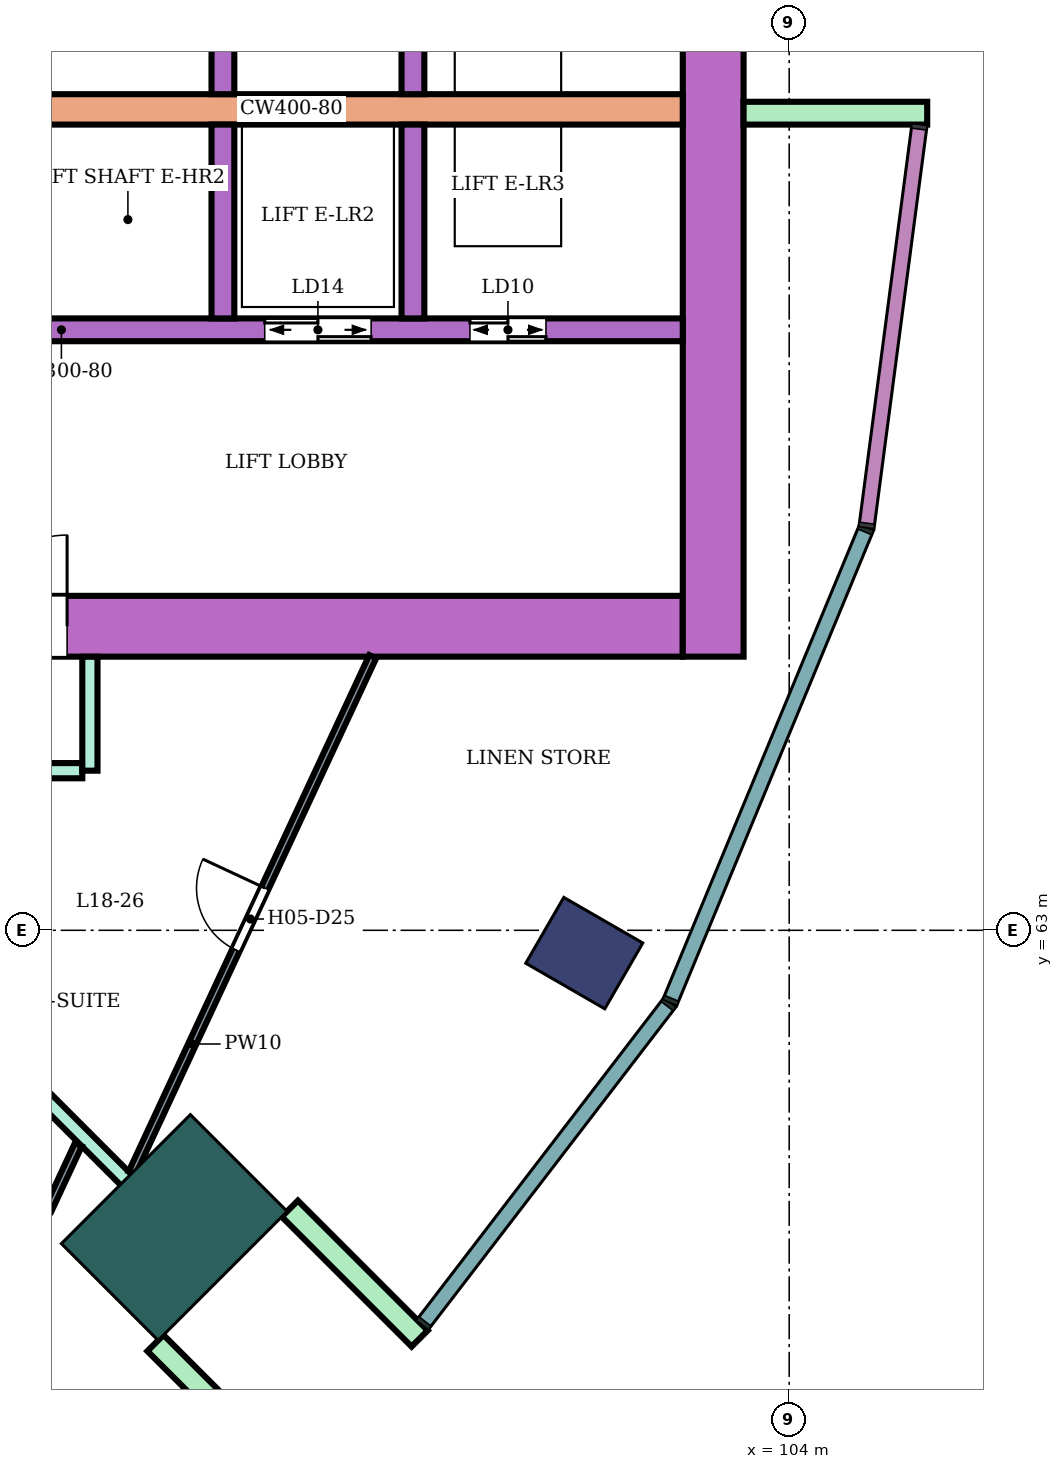
"""IFC4 building model, lengths in metres.
Left out: names, types, materials, properties, quantities, classifications, styles, units other than length and angle.
Written with IfcOpenShell. Run it as: python <this file> out.ifc"""

import sys

from ifc_helpers import new_model, si_unit, direction, frame, frame_2d, origin, origin_2d, place, context, subcontext, project, spatial, rectangle, extrude, element, fill, save


model = new_model("IFC4")
c1 = context("Model", 3, precision=1e-05, world=origin(), true_north=direction((0.0, 1.0)))
c2 = subcontext(c1, "Body", "Model", "MODEL_VIEW")
j1 = project(units=[si_unit("LENGTHUNIT", "METRE"), si_unit("PLANEANGLEUNIT", "RADIAN")], contexts=[c1])
p1 = place(None, origin())
s1 = spatial("IfcSite", under=j1, at=p1, CompositionType="ELEMENT")
p2 = place(p1, origin())
s2 = spatial("IfcBuilding", under=s1, at=p2, CompositionType="ELEMENT")
p3 = place(p2, frame((0.0, 0.0, 82.4)))
s3 = spatial("IfcBuildingStorey", under=s2, at=p3, CompositionType="ELEMENT", Elevation=82.4)
p4 = place(p3, frame((101.304, 62.7, 0.0), z_axis=(0.0, 0.0, 1.0), x_axis=(0.866025403784, -0.5, 0.0)))
e1 = element("IfcColumn", 1, at=p4, inside=s3, PredefinedType="COLUMN", context=c2, shape_type="SweptSolid", body=[
    extrude(rectangle(XDim=1.2, YDim=1.0, at=origin_2d()), origin(), (0.0, 0.0, 1.0), 3.8),
])
p5 = place(p3, frame((95.91, 59.09, 0.0), z_axis=(0.0, 0.0, 1.0), x_axis=(0.707106781187, -0.707106781187, 0.0)))
e2 = element("IfcColumn", 2, at=p5, inside=s3, PredefinedType="COLUMN", context=c2, shape_type="SweptSolid", body=[
    extrude(rectangle(XDim=1.8, YDim=2.4, at=origin_2d()), origin(), (0.0, 0.0, 1.0), 3.8),
])
p6 = place(p3, frame((87.9, 67.0, 0.0), z_axis=(0.0, 0.0, 1.0), x_axis=(1.0, 0.0, 0.0)))
e3 = element("IfcWall", 3, at=p6, inside=s3, PredefinedType="SHEAR", context=c2, shape_type="SweptSolid", body=[
    extrude(rectangle(XDim=14.7, YDim=0.8, at=frame_2d((7.35, 0.0))), origin(), (0.0, 0.0, 1.0), 3.48),
])
p7 = place(p6, frame((4.2, 0.0, 0.0)))
e4 = element("IfcOpeningElement", 4, at=p7, cuts=e3, PredefinedType="OPENING", context=c2, shape_type="SweptSolid", body=[
    extrude(rectangle(XDim=2.4, YDim=2.4, at=frame_2d((1.2, 1.2))), frame((0.0, 0.41, 0.0), z_axis=(0.0, -1.0, 0.0), x_axis=(1.0, 0.0, 0.0)), (0.0, 0.0, 1.0), 0.82),
])
p8 = place(p3, frame((103.0, 66.6, 0.0), z_axis=(0.0, 0.0, 1.0), x_axis=(0.0, 1.0, 0.0)))
e5 = element("IfcWall", 5, at=p8, inside=s3, PredefinedType="SHEAR", context=c2, shape_type="SweptSolid", body=[
    extrude(rectangle(XDim=16.8, YDim=0.8, at=frame_2d((8.4, 0.0))), origin(), (0.0, 0.0, 1.0), 3.48),
])
p9 = place(p3, frame((91.7, 73.8, 0.0), z_axis=(0.0, 0.0, 1.0), x_axis=(1.0, 0.0, 0.0)))
e6 = element("IfcWall", 6, at=p9, inside=s3, PredefinedType="SHEAR", context=c2, shape_type="SweptSolid", body=[
    extrude(rectangle(XDim=10.9, YDim=0.4, at=frame_2d((5.45, 0.0))), origin(), (0.0, 0.0, 1.0), 3.48),
])
p10 = place(p3, frame((91.7, 70.9, 0.0), z_axis=(0.0, 0.0, 1.0), x_axis=(1.0, 0.0, 0.0)))
e7 = element("IfcWall", 7, at=p10, inside=s3, PredefinedType="SHEAR", context=c2, shape_type="SweptSolid", body=[
    extrude(rectangle(XDim=10.9, YDim=0.3, at=frame_2d((5.45, 0.0))), origin(), (0.0, 0.0, 1.0), 3.48),
])
p11 = place(p10, frame((0.4, 0.0, 0.0)))
e8 = element("IfcOpeningElement", 8, at=p11, cuts=e7, PredefinedType="OPENING", context=c2, shape_type="SweptSolid", body=[
    extrude(rectangle(XDim=1.4, YDim=2.1, at=frame_2d((0.7, 1.05))), frame((0.0, 0.16, 0.0), z_axis=(0.0, -1.0, 0.0), x_axis=(1.0, 0.0, 0.0)), (0.0, 0.0, 1.0), 0.32),
])
p12 = place(p10, frame((5.4, 0.0, 0.0)))
e9 = element("IfcOpeningElement", 9, at=p12, cuts=e7, PredefinedType="OPENING", context=c2, shape_type="SweptSolid", body=[
    extrude(rectangle(XDim=1.4, YDim=2.1, at=frame_2d((0.7, 1.05))), frame((0.0, 0.16, 0.0), z_axis=(0.0, -1.0, 0.0), x_axis=(1.0, 0.0, 0.0)), (0.0, 0.0, 1.0), 0.32),
])
p13 = place(p10, frame((8.1, 0.0, 0.0)))
e10 = element("IfcOpeningElement", 10, at=p13, cuts=e7, PredefinedType="OPENING", context=c2, shape_type="SweptSolid", body=[
    extrude(rectangle(XDim=1.0, YDim=2.1, at=frame_2d((0.5, 1.05))), frame((0.0, 0.16, 0.0), z_axis=(0.0, -1.0, 0.0), x_axis=(1.0, 0.0, 0.0)), (0.0, 0.0, 1.0), 0.32),
])
for number, where, z_axis, x_axis in (
    (11, (96.55, 74.0, 0.0), (0.0, 0.0, 1.0), (0.0, 1.0, 0.0)),
    (12, (99.05, 74.0, 0.0), (0.0, 0.0, 1.0), (0.0, 1.0, 0.0)),
    (13, (96.55, 71.05, 0.0), (0.0, 0.0, 1.0), (0.0, 1.0, 0.0)),
    (14, (99.05, 71.05, 0.0), (0.0, 0.0, 1.0), (0.0, 1.0, 0.0)),
):
    element("IfcWall", number, at=place(p3, frame(where, z_axis=z_axis, x_axis=x_axis)), inside=s3, PredefinedType="SHEAR", context=c2, shape_type="SweptSolid", body=[
        extrude(rectangle(XDim=2.55, YDim=0.3, at=frame_2d((1.275, 0.0))), origin(), (0.0, 0.0, 1.0), 3.48),
    ])
for number, where, z_axis, x_axis in (
    (15, (103.4, 73.75, 0.0), (0.0, 0.0, 1.0), (1.0, 0.0, 0.0)),
    (16, (95.662, 57.57, 0.0), (0.0, 0.0, 1.0), (0.707, -0.707, 0.0)),
    (17, (97.43, 59.338, 0.0), (0.0, 0.0, 1.0), (0.707, -0.707, 0.0)),
):
    element("IfcWall", number, at=place(p3, frame(where, z_axis=z_axis, x_axis=x_axis)), inside=s3, PredefinedType="NOTDEFINED", context=c2, shape_type="SweptSolid", body=[
        extrude(rectangle(XDim=2.416, YDim=0.3, at=frame_2d((1.208, 0.0))), origin(), (0.0, 0.0, 1.0), 3.8),
    ])
p14 = place(p3, frame((92.692, 62.303, 0.0), z_axis=(0.0, 0.0, 1.0), x_axis=(0.706920663731, -0.707292849667, 0.0)))
e18 = element("IfcWall", 18, at=p14, inside=s3, PredefinedType="PARTITIONING", context=c2, shape_type="SweptSolid", body=[
    extrude(rectangle(XDim=5.248, YDim=0.2, at=frame_2d((2.624, 0.0))), origin(), (0.0, 0.0, 1.0), 3.35),
])
p15 = place(p3, frame((93.851, 65.1, 0.0), z_axis=(0.0, 0.0, 1.0), x_axis=(1.0, 0.0, 0.0)))
e19 = element("IfcWall", 19, at=p15, inside=s3, PredefinedType="PARTITIONING", context=c2, shape_type="SweptSolid", body=[
    extrude(rectangle(XDim=0.849, YDim=0.2, at=frame_2d((0.424, 0.0))), origin(), (0.0, 0.0, 1.0), 3.35),
])
p16 = place(p3, frame((94.8, 65.1, 0.0), z_axis=(0.0, 0.0, 1.0), x_axis=(0.0, 1.0, 0.0)))
e20 = element("IfcWall", 20, at=p16, inside=s3, PredefinedType="PARTITIONING", context=c2, shape_type="SweptSolid", body=[
    extrude(rectangle(XDim=1.499, YDim=0.2, at=frame_2d((0.75, 0.0))), origin(), (0.0, 0.0, 1.0), 3.35),
])
p17 = place(p3, frame((94.247, 59.32, 0.0), z_axis=(0.0, 0.0, 1.0), x_axis=(0.422660124657, 0.906288264861, 0.0)))
e21 = element("IfcWall", 21, at=p17, inside=s3, PredefinedType="PARTITIONING", context=c2, shape_type="SweptSolid", body=[
    extrude(rectangle(XDim=0.949, YDim=0.1, at=frame_2d((0.475, 0.0))), origin(), (0.0, 0.0, 1.0), 3.35),
])
p18 = place(p3, frame((95.355, 59.806, 0.0), z_axis=(0.0, 0.0, 1.0), x_axis=(0.422407546544, 0.906406015328, 0.0)))
e22 = element("IfcWall", 22, at=p18, inside=s3, PredefinedType="PARTITIONING", context=c2, shape_type="SweptSolid", body=[
    extrude(rectangle(XDim=7.496, YDim=0.1, at=frame_2d((3.748, 0.0))), origin(), (0.0, 0.0, 1.0), 3.35),
])
p19 = place(p18, frame((3.238, 0.0, 0.0)))
e23 = element("IfcOpeningElement", 23, at=p19, cuts=e22, PredefinedType="OPENING", context=c2, shape_type="SweptSolid", body=[
    extrude(rectangle(XDim=0.9, YDim=2.1, at=frame_2d((0.45, 1.05))), frame((0.0, 0.06, 0.0), z_axis=(0.0, -1.0, 0.0), x_axis=(1.0, 0.0, 0.0)), (0.0, 0.0, 1.0), 0.12),
])
p20 = place(p19, origin())
e24 = element("IfcDoor", 24, at=p20, inside=s3, OperationType="SINGLE_SWING_RIGHT", PredefinedType="DOOR", context=c2, shape_type="SweptSolid", body=[
    extrude(rectangle(XDim=0.9, YDim=2.1, at=frame_2d((0.45, 1.05))), frame((0.0, 0.025, 0.0), z_axis=(0.0, -1.0, 0.0), x_axis=(1.0, 0.0, 0.0)), (0.0, 0.0, 1.0), 0.05),
])
fill(e23, e24)
p21 = place(p12, origin())
e25 = element("IfcDoor", 25, at=p21, inside=s3, OperationType="DOUBLE_DOOR_SLIDING", PredefinedType="DOOR", context=c2, shape_type="SweptSolid", body=[
    extrude(rectangle(XDim=1.4, YDim=2.1, at=frame_2d((0.7, 1.05))), frame((0.0, 0.025, 0.0), z_axis=(0.0, -1.0, 0.0), x_axis=(1.0, 0.0, 0.0)), (0.0, 0.0, 1.0), 0.05),
])
fill(e9, e25)
p22 = place(p13, origin())
e26 = element("IfcDoor", 26, at=p22, inside=s3, OperationType="DOUBLE_DOOR_SLIDING", PredefinedType="DOOR", context=c2, shape_type="SweptSolid", body=[
    extrude(rectangle(XDim=1.0, YDim=2.1, at=frame_2d((0.5, 1.05))), frame((0.0, 0.025, 0.0), z_axis=(0.0, -1.0, 0.0), x_axis=(1.0, 0.0, 0.0)), (0.0, 0.0, 1.0), 0.05),
])
fill(e10, e26)
p23 = place(p7, origin())
e27 = element("IfcDoor", 27, at=p23, inside=s3, OperationType="DOUBLE_DOOR_SINGLE_SWING", PredefinedType="DOOR", context=c2, shape_type="SweptSolid", body=[
    extrude(rectangle(XDim=2.4, YDim=2.4, at=frame_2d((1.2, 1.2))), frame((0.0, 0.025, 0.0), z_axis=(0.0, -1.0, 0.0), x_axis=(1.0, 0.0, 0.0)), (0.0, 0.0, 1.0), 0.05),
])
fill(e4, e27)
save(model, sys.argv[1])
